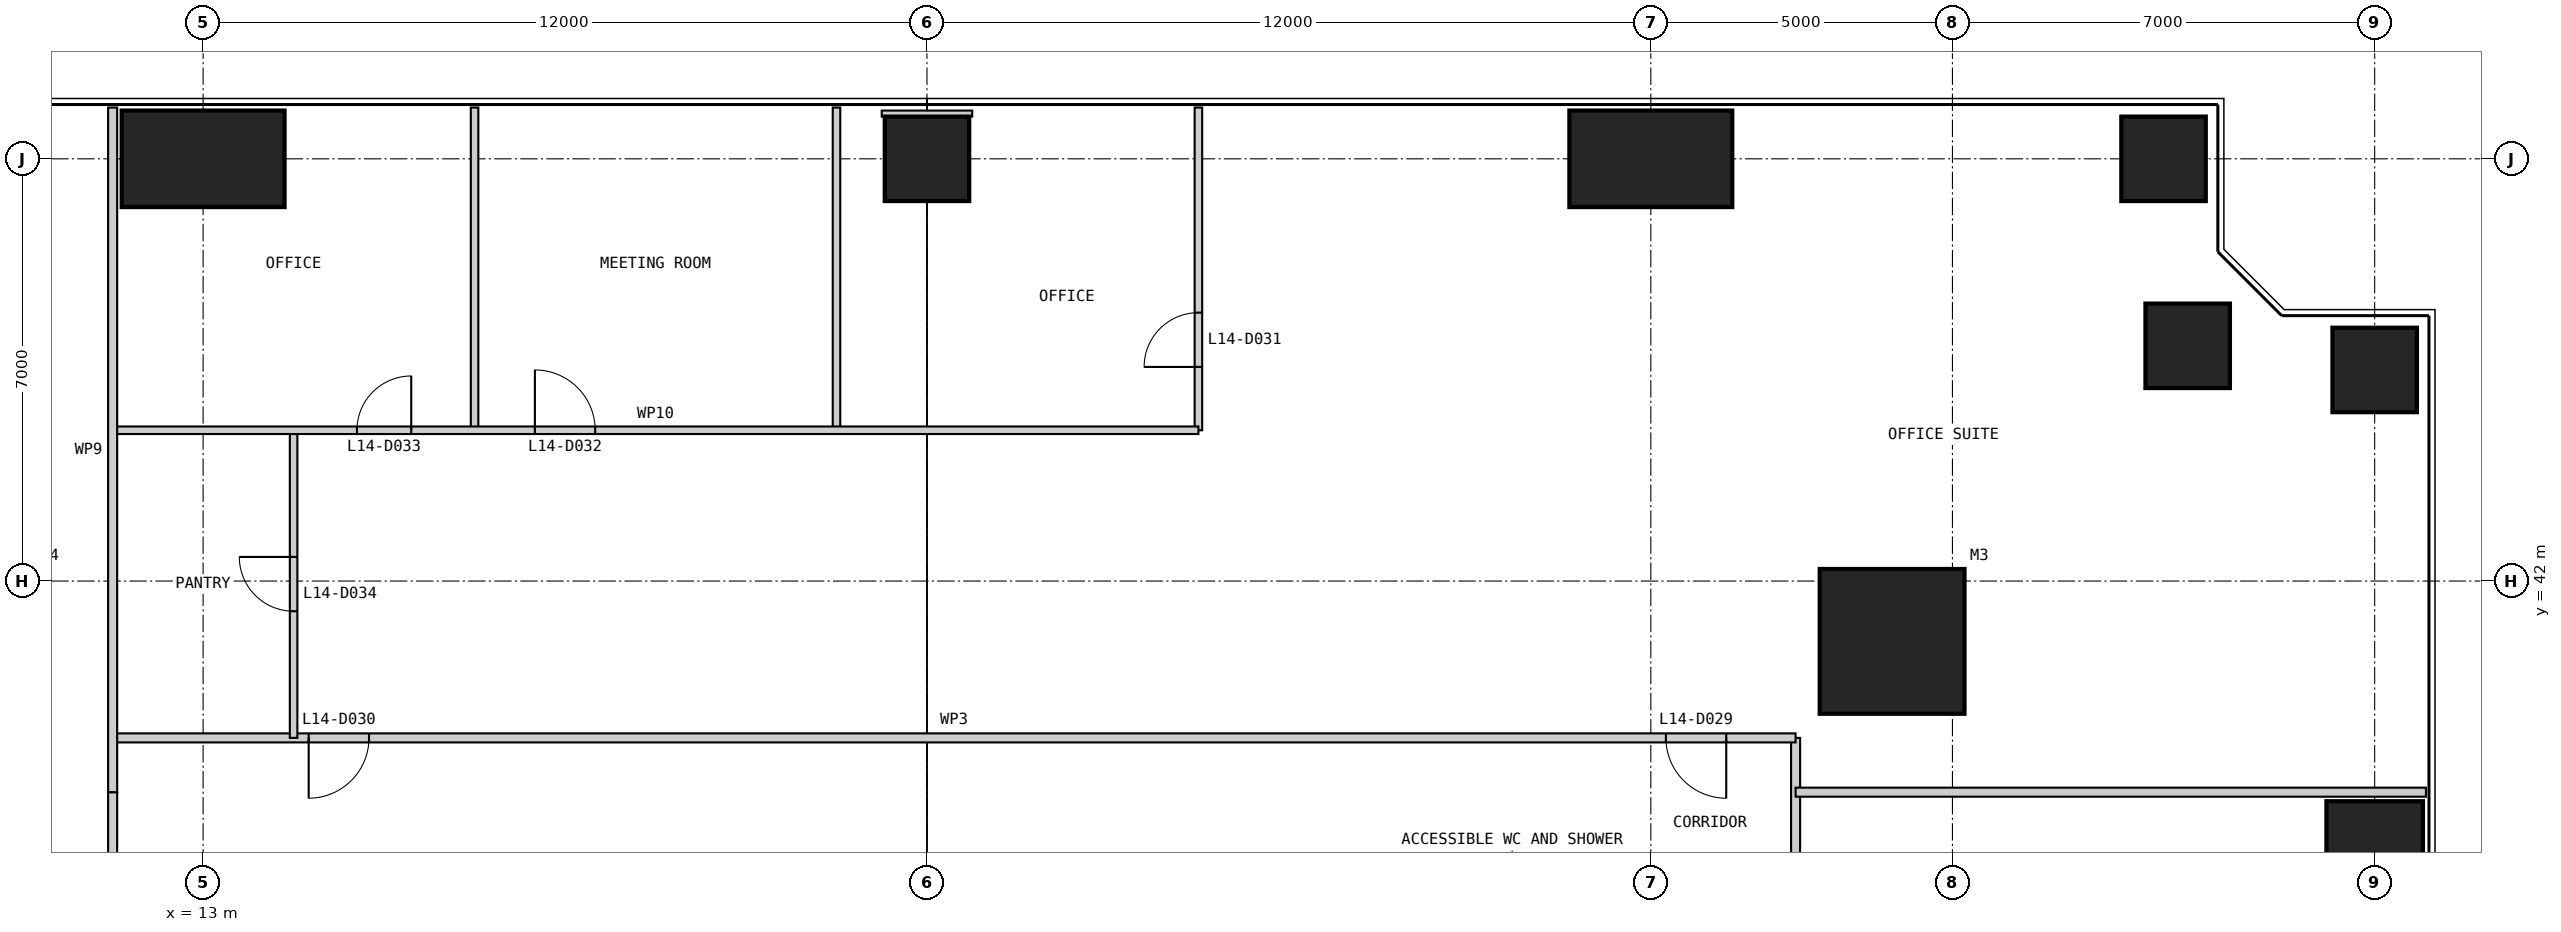
"""IFC4 building model, lengths in metres.
Left out: names, types, materials, properties, quantities, classifications, styles, units other than length and angle.
Written with IfcOpenShell. Run it as: python <this file> out.ifc"""

import sys

from ifc_helpers import new_model, si_unit, direction, frame, frame_2d, origin, origin_2d, place, context, subcontext, project, spatial, rectangle, extrude, element, fill, save


model = new_model("IFC4")
c1 = context("Model", 3, precision=1e-05, world=origin(), true_north=direction((0.0, 1.0)))
c2 = subcontext(c1, "Body", "Model", "MODEL_VIEW")
j1 = project(units=[si_unit("LENGTHUNIT", "METRE"), si_unit("PLANEANGLEUNIT", "RADIAN")], contexts=[c1])
p1 = place(None, origin())
s1 = spatial("IfcSite", under=j1, at=p1, CompositionType="ELEMENT")
p2 = place(p1, origin())
s2 = spatial("IfcBuilding", under=s1, at=p2, CompositionType="ELEMENT")
p3 = place(p2, frame((0.0, 0.0, 63.0)))
s3 = spatial("IfcBuildingStorey", under=s2, at=p3, CompositionType="ELEMENT", Elevation=63.0)
p4 = place(p3, frame((41.0, 41.0, 0.0), z_axis=(0.0, 0.0, 1.0), x_axis=(1.0, 0.0, 0.0)))
e1 = element("IfcColumn", 1, at=p4, inside=s3, PredefinedType="COLUMN", context=c2, shape_type="SweptSolid", body=[
    extrude(rectangle(XDim=2.4, YDim=2.4, at=origin_2d()), origin(), (0.0, 0.0, 1.0), 4.0),
])
p5 = place(p3, frame((49.0, 37.0, 0.0), z_axis=(0.0, 0.0, 1.0), x_axis=(1.0, 0.0, 0.0)))
e2 = element("IfcColumn", 2, at=p5, inside=s3, PredefinedType="COLUMN", context=c2, shape_type="SweptSolid", body=[
    extrude(rectangle(XDim=1.6, YDim=2.7, at=origin_2d()), origin(), (0.0, 0.0, 1.0), 4.0),
])
for number, where, z_axis, x_axis in (
    (3, (49.0, 45.5, 0.0), (0.0, 0.0, 1.0), (1.0, 0.0, 0.0)),
    (4, (45.9, 45.9, 0.0), (0.0, 0.0, 1.0), (1.0, 0.0, 0.0)),
    (5, (45.5, 49.0, 0.0), (0.0, 0.0, 1.0), (1.0, 0.0, 0.0)),
):
    element("IfcColumn", number, at=place(p3, frame(where, z_axis=z_axis, x_axis=x_axis)), inside=s3, PredefinedType="COLUMN", context=c2, shape_type="SweptSolid", body=[
        extrude(rectangle(XDim=1.4, YDim=1.4, at=origin_2d()), origin(), (0.0, 0.0, 1.0), 4.0),
    ])
p6 = place(p3, frame((37.0, 49.0, 0.0), z_axis=(0.0, 0.0, 1.0), x_axis=(1.0, 0.0, 0.0)))
e6 = element("IfcColumn", 6, at=p6, inside=s3, PredefinedType="COLUMN", context=c2, shape_type="SweptSolid", body=[
    extrude(rectangle(XDim=2.7, YDim=1.6, at=origin_2d()), origin(), (0.0, 0.0, 1.0), 4.0),
])
p7 = place(p3, frame((25.0, 49.0, 0.0), z_axis=(0.0, 0.0, 1.0), x_axis=(1.0, 0.0, 0.0)))
e7 = element("IfcColumn", 7, at=p7, inside=s3, PredefinedType="COLUMN", context=c2, shape_type="SweptSolid", body=[
    extrude(rectangle(XDim=1.4, YDim=1.4, at=origin_2d()), origin(), (0.0, 0.0, 1.0), 4.0),
])
p8 = place(p3, frame((13.0, 49.0, 0.0), z_axis=(0.0, 0.0, 1.0), x_axis=(1.0, 0.0, 0.0)))
e8 = element("IfcColumn", 8, at=p8, inside=s3, PredefinedType="COLUMN", context=c2, shape_type="SweptSolid", body=[
    extrude(rectangle(XDim=2.7, YDim=1.6, at=origin_2d()), origin(), (0.0, 0.0, 1.0), 4.0),
])
p9 = place(p3, frame((39.4, 11.5, 0.0), z_axis=(0.0, 0.0, 1.0), x_axis=(0.0, 1.0, 0.0)))
e9 = element("IfcWall", 9, at=p9, inside=s3, PredefinedType="PARTITIONING", context=c2, shape_type="SweptSolid", body=[
    extrude(rectangle(XDim=27.9, YDim=0.15, at=frame_2d((13.95, 0.0))), origin(), (0.0, 0.0, 1.0), 3.85),
])
p10 = place(p9, frame((2.5, 0.0, 0.0)))
e10 = element("IfcOpeningElement", 10, at=p10, cuts=e9, PredefinedType="OPENING", context=c2, shape_type="SweptSolid", body=[
    extrude(rectangle(XDim=1.0, YDim=2.2, at=frame_2d((0.5, 1.1))), frame((0.0, 0.085, 0.0), z_axis=(0.0, -1.0, 0.0), x_axis=(1.0, 0.0, 0.0)), (0.0, 0.0, 1.0), 0.17),
])
p11 = place(p9, frame((9.25, 0.0, 0.0)))
e11 = element("IfcOpeningElement", 11, at=p11, cuts=e9, PredefinedType="OPENING", context=c2, shape_type="SweptSolid", body=[
    extrude(rectangle(XDim=1.0, YDim=2.2, at=frame_2d((0.5, 1.1))), frame((0.0, 0.085, 0.0), z_axis=(0.0, -1.0, 0.0), x_axis=(1.0, 0.0, 0.0)), (0.0, 0.0, 1.0), 0.17),
])
p12 = place(p9, frame((16.75, 0.0, 0.0)))
e12 = element("IfcOpeningElement", 12, at=p12, cuts=e9, PredefinedType="OPENING", context=c2, shape_type="SweptSolid", body=[
    extrude(rectangle(XDim=1.0, YDim=2.2, at=frame_2d((0.5, 1.1))), frame((0.0, 0.085, 0.0), z_axis=(0.0, -1.0, 0.0), x_axis=(1.0, 0.0, 0.0)), (0.0, 0.0, 1.0), 0.17),
])
p13 = place(p9, frame((23.5, 0.0, 0.0)))
e13 = element("IfcOpeningElement", 13, at=p13, cuts=e9, PredefinedType="OPENING", context=c2, shape_type="SweptSolid", body=[
    extrude(rectangle(XDim=1.0, YDim=2.2, at=frame_2d((0.5, 1.1))), frame((0.0, 0.085, 0.0), z_axis=(0.0, -1.0, 0.0), x_axis=(1.0, 0.0, 0.0)), (0.0, 0.0, 1.0), 0.17),
])
p14 = place(p3, frame((39.4, 39.4, 0.0), z_axis=(0.0, 0.0, 1.0), x_axis=(-1.0, 0.0, 0.0)))
e14 = element("IfcWall", 14, at=p14, inside=s3, PredefinedType="PARTITIONING", context=c2, shape_type="SweptSolid", body=[
    extrude(rectangle(XDim=27.9, YDim=0.15, at=frame_2d((13.95, 0.0))), origin(), (0.0, 0.0, 1.0), 3.85),
])
p15 = place(p14, frame((1.15, 0.0, 0.0)))
e15 = element("IfcOpeningElement", 15, at=p15, cuts=e14, PredefinedType="OPENING", context=c2, shape_type="SweptSolid", body=[
    extrude(rectangle(XDim=1.0, YDim=2.2, at=frame_2d((0.5, 1.1))), frame((0.0, 0.085, 0.0), z_axis=(0.0, -1.0, 0.0), x_axis=(1.0, 0.0, 0.0)), (0.0, 0.0, 1.0), 0.17),
])
p16 = place(p14, frame((23.65, 0.0, 0.0)))
e16 = element("IfcOpeningElement", 16, at=p16, cuts=e14, PredefinedType="OPENING", context=c2, shape_type="SweptSolid", body=[
    extrude(rectangle(XDim=1.0, YDim=2.2, at=frame_2d((0.5, 1.1))), frame((0.0, 0.085, 0.0), z_axis=(0.0, -1.0, 0.0), x_axis=(1.0, 0.0, 0.0)), (0.0, 0.0, 1.0), 0.17),
])
p17 = place(p3, frame((49.85, 38.5, 0.0), z_axis=(0.0, 0.0, 1.0), x_axis=(-1.0, 0.0, 0.0)))
e17 = element("IfcWall", 17, at=p17, inside=s3, PredefinedType="PARTITIONING", context=c2, shape_type="SweptSolid", body=[
    extrude(rectangle(XDim=10.45, YDim=0.15, at=frame_2d((5.225, 0.0))), origin(), (0.0, 0.0, 1.0), 3.85),
])
p18 = place(p3, frame((29.5, 49.85, 0.0), z_axis=(0.0, 0.0, 1.0), x_axis=(0.0, -1.0, 0.0)))
e18 = element("IfcWall", 18, at=p18, inside=s3, PredefinedType="PARTITIONING", context=c2, shape_type="SweptSolid", body=[
    extrude(rectangle(XDim=5.35, YDim=0.125, at=frame_2d((2.675, 0.0))), origin(), (0.0, 0.0, 1.0), 3.85),
])
p19 = place(p18, frame((3.4, 0.0, 0.0)))
e19 = element("IfcOpeningElement", 19, at=p19, cuts=e18, PredefinedType="OPENING", context=c2, shape_type="SweptSolid", body=[
    extrude(rectangle(XDim=0.9, YDim=2.2, at=frame_2d((0.45, 1.1))), frame((0.0, 0.073, 0.0), z_axis=(0.0, -1.0, 0.0), x_axis=(1.0, 0.0, 0.0)), (0.0, 0.0, 1.0), 0.145),
])
for number, where, z_axis, x_axis in (
    (20, (23.5, 49.85, 0.0), (0.0, 0.0, 1.0), (0.0, -1.0, 0.0)),
    (21, (17.5, 49.85, 0.0), (0.0, 0.0, 1.0), (0.0, -1.0, 0.0)),
):
    element("IfcWall", number, at=place(p3, frame(where, z_axis=z_axis, x_axis=x_axis)), inside=s3, PredefinedType="PARTITIONING", context=c2, shape_type="SweptSolid", body=[
        extrude(rectangle(XDim=5.35, YDim=0.125, at=frame_2d((2.675, 0.0))), origin(), (0.0, 0.0, 1.0), 3.85),
    ])
p20 = place(p3, frame((14.5, 44.5, 0.0), z_axis=(0.0, 0.0, 1.0), x_axis=(0.0, -1.0, 0.0)))
e22 = element("IfcWall", 22, at=p20, inside=s3, PredefinedType="PARTITIONING", context=c2, shape_type="SweptSolid", body=[
    extrude(rectangle(XDim=5.1, YDim=0.125, at=frame_2d((2.55, 0.0))), origin(), (0.0, 0.0, 1.0), 3.85),
])
p21 = place(p20, frame((2.1, 0.0, 0.0)))
e23 = element("IfcOpeningElement", 23, at=p21, cuts=e22, PredefinedType="OPENING", context=c2, shape_type="SweptSolid", body=[
    extrude(rectangle(XDim=0.9, YDim=2.2, at=frame_2d((0.45, 1.1))), frame((0.0, 0.073, 0.0), z_axis=(0.0, -1.0, 0.0), x_axis=(1.0, 0.0, 0.0)), (0.0, 0.0, 1.0), 0.145),
])
p22 = place(p3, frame((29.5, 44.5, 0.0), z_axis=(0.0, 0.0, 1.0), x_axis=(-1.0, 0.0, 0.0)))
e24 = element("IfcWall", 24, at=p22, inside=s3, PredefinedType="PARTITIONING", context=c2, shape_type="SweptSolid", body=[
    extrude(rectangle(XDim=18.0, YDim=0.125, at=frame_2d((9.0, 0.0))), origin(), (0.0, 0.0, 1.0), 3.85),
])
p23 = place(p22, frame((10.0, 0.0, 0.0)))
e25 = element("IfcOpeningElement", 25, at=p23, cuts=e24, PredefinedType="OPENING", context=c2, shape_type="SweptSolid", body=[
    extrude(rectangle(XDim=1.0, YDim=2.2, at=frame_2d((0.5, 1.1))), frame((0.0, 0.073, 0.0), z_axis=(0.0, -1.0, 0.0), x_axis=(1.0, 0.0, 0.0)), (0.0, 0.0, 1.0), 0.145),
])
p24 = place(p22, frame((13.05, 0.0, 0.0)))
e26 = element("IfcOpeningElement", 26, at=p24, cuts=e24, PredefinedType="OPENING", context=c2, shape_type="SweptSolid", body=[
    extrude(rectangle(XDim=0.9, YDim=2.2, at=frame_2d((0.45, 1.1))), frame((0.0, 0.073, 0.0), z_axis=(0.0, -1.0, 0.0), x_axis=(1.0, 0.0, 0.0)), (0.0, 0.0, 1.0), 0.145),
])
p25 = place(p3, frame((11.5, 38.5, 0.0), z_axis=(0.0, 0.0, 1.0), x_axis=(0.0, -1.0, 0.0)))
e27 = element("IfcWall", 27, at=p25, inside=s3, PredefinedType="PARTITIONING", context=c2, shape_type="SweptSolid", body=[
    extrude(rectangle(XDim=27.0, YDim=0.15, at=frame_2d((13.5, 0.0))), origin(), (0.0, 0.0, 1.0), 3.85),
])
p26 = place(p25, frame((4.0, 0.0, 0.0)))
e28 = element("IfcOpeningElement", 28, at=p26, cuts=e27, PredefinedType="OPENING", context=c2, shape_type="SweptSolid", body=[
    extrude(rectangle(XDim=1.0, YDim=2.2, at=frame_2d((0.5, 1.1))), frame((0.0, 0.085, 0.0), z_axis=(0.0, -1.0, 0.0), x_axis=(1.0, 0.0, 0.0)), (0.0, 0.0, 1.0), 0.17),
])
p27 = place(p25, frame((10.0, 0.0, 0.0)))
e29 = element("IfcOpeningElement", 29, at=p27, cuts=e27, PredefinedType="OPENING", context=c2, shape_type="SweptSolid", body=[
    extrude(rectangle(XDim=1.0, YDim=2.2, at=frame_2d((0.5, 1.1))), frame((0.0, 0.085, 0.0), z_axis=(0.0, -1.0, 0.0), x_axis=(1.0, 0.0, 0.0)), (0.0, 0.0, 1.0), 0.17),
])
p28 = place(p25, frame((17.5, 0.0, 0.0)))
e30 = element("IfcOpeningElement", 30, at=p28, cuts=e27, PredefinedType="OPENING", context=c2, shape_type="SweptSolid", body=[
    extrude(rectangle(XDim=1.0, YDim=2.2, at=frame_2d((0.5, 1.1))), frame((0.0, 0.085, 0.0), z_axis=(0.0, -1.0, 0.0), x_axis=(1.0, 0.0, 0.0)), (0.0, 0.0, 1.0), 0.17),
])
p29 = place(p25, frame((23.5, 0.0, 0.0)))
e31 = element("IfcOpeningElement", 31, at=p29, cuts=e27, PredefinedType="OPENING", context=c2, shape_type="SweptSolid", body=[
    extrude(rectangle(XDim=1.0, YDim=2.2, at=frame_2d((0.5, 1.1))), frame((0.0, 0.085, 0.0), z_axis=(0.0, -1.0, 0.0), x_axis=(1.0, 0.0, 0.0)), (0.0, 0.0, 1.0), 0.17),
])
p30 = place(p3, frame((11.5, 49.85, 0.0), z_axis=(0.0, 0.0, 1.0), x_axis=(0.0, -1.0, 0.0)))
e32 = element("IfcWall", 32, at=p30, inside=s3, PredefinedType="PARTITIONING", context=c2, shape_type="SweptSolid", body=[
    extrude(rectangle(XDim=11.35, YDim=0.15, at=frame_2d((5.675, 0.0))), origin(), (0.0, 0.0, 1.0), 3.85),
])
p31 = place(p3, frame((25.0, 49.8, 0.0), z_axis=(0.0, 0.0, 1.0), x_axis=(0.0, -1.0, 0.0)))
e33 = element("IfcWall", 33, at=p31, inside=s3, PredefinedType="PARTITIONING", context=c2, shape_type="SweptSolid", body=[
    extrude(rectangle(XDim=0.1, YDim=1.5, at=frame_2d((0.05, 0.0))), origin(), (0.0, 0.0, 1.0), 3.85),
])
p32 = place(p15, origin())
e34 = element("IfcDoor", 34, at=p32, inside=s3, OperationType="SINGLE_SWING_LEFT", PredefinedType="DOOR", context=c2, shape_type="SweptSolid", body=[
    extrude(rectangle(XDim=1.0, YDim=2.2, at=frame_2d((0.5, 1.1))), frame((0.0, 0.025, 0.0), z_axis=(0.0, -1.0, 0.0), x_axis=(1.0, 0.0, 0.0)), (0.0, 0.0, 1.0), 0.05),
])
fill(e15, e34)
p33 = place(p16, origin())
e35 = element("IfcDoor", 35, at=p33, inside=s3, OperationType="SINGLE_SWING_RIGHT", PredefinedType="DOOR", context=c2, shape_type="SweptSolid", body=[
    extrude(rectangle(XDim=1.0, YDim=2.2, at=frame_2d((0.5, 1.1))), frame((0.0, 0.025, 0.0), z_axis=(0.0, -1.0, 0.0), x_axis=(1.0, 0.0, 0.0)), (0.0, 0.0, 1.0), 0.05),
])
fill(e16, e35)
p34 = place(p19, frame((0.9, 0.0, 0.0), z_axis=(0.0, 0.0, 1.0), x_axis=(-1.0, 0.0, 0.0)))
e36 = element("IfcDoor", 36, at=p34, inside=s3, OperationType="SINGLE_SWING_LEFT", PredefinedType="DOOR", context=c2, shape_type="SweptSolid", body=[
    extrude(rectangle(XDim=0.9, YDim=2.2, at=frame_2d((0.45, 1.1))), frame((0.0, 0.025, 0.0), z_axis=(0.0, -1.0, 0.0), x_axis=(1.0, 0.0, 0.0)), (0.0, 0.0, 1.0), 0.05),
])
fill(e19, e36)
p35 = place(p23, frame((1.0, 0.0, 0.0), z_axis=(0.0, 0.0, 1.0), x_axis=(-1.0, 0.0, 0.0)))
e37 = element("IfcDoor", 37, at=p35, inside=s3, OperationType="SINGLE_SWING_LEFT", PredefinedType="DOOR", context=c2, shape_type="SweptSolid", body=[
    extrude(rectangle(XDim=1.0, YDim=2.2, at=frame_2d((0.5, 1.1))), frame((0.0, 0.025, 0.0), z_axis=(0.0, -1.0, 0.0), x_axis=(1.0, 0.0, 0.0)), (0.0, 0.0, 1.0), 0.05),
])
fill(e25, e37)
p36 = place(p24, frame((0.9, 0.0, 0.0), z_axis=(0.0, 0.0, 1.0), x_axis=(-1.0, 0.0, 0.0)))
e38 = element("IfcDoor", 38, at=p36, inside=s3, OperationType="SINGLE_SWING_RIGHT", PredefinedType="DOOR", context=c2, shape_type="SweptSolid", body=[
    extrude(rectangle(XDim=0.9, YDim=2.2, at=frame_2d((0.45, 1.1))), frame((0.0, 0.025, 0.0), z_axis=(0.0, -1.0, 0.0), x_axis=(1.0, 0.0, 0.0)), (0.0, 0.0, 1.0), 0.05),
])
fill(e26, e38)
p37 = place(p21, frame((0.9, 0.0, 0.0), z_axis=(0.0, 0.0, 1.0), x_axis=(-1.0, 0.0, 0.0)))
e39 = element("IfcDoor", 39, at=p37, inside=s3, OperationType="SINGLE_SWING_RIGHT", PredefinedType="DOOR", context=c2, shape_type="SweptSolid", body=[
    extrude(rectangle(XDim=0.9, YDim=2.2, at=frame_2d((0.45, 1.1))), frame((0.0, 0.025, 0.0), z_axis=(0.0, -1.0, 0.0), x_axis=(1.0, 0.0, 0.0)), (0.0, 0.0, 1.0), 0.05),
])
fill(e23, e39)
save(model, sys.argv[1])
